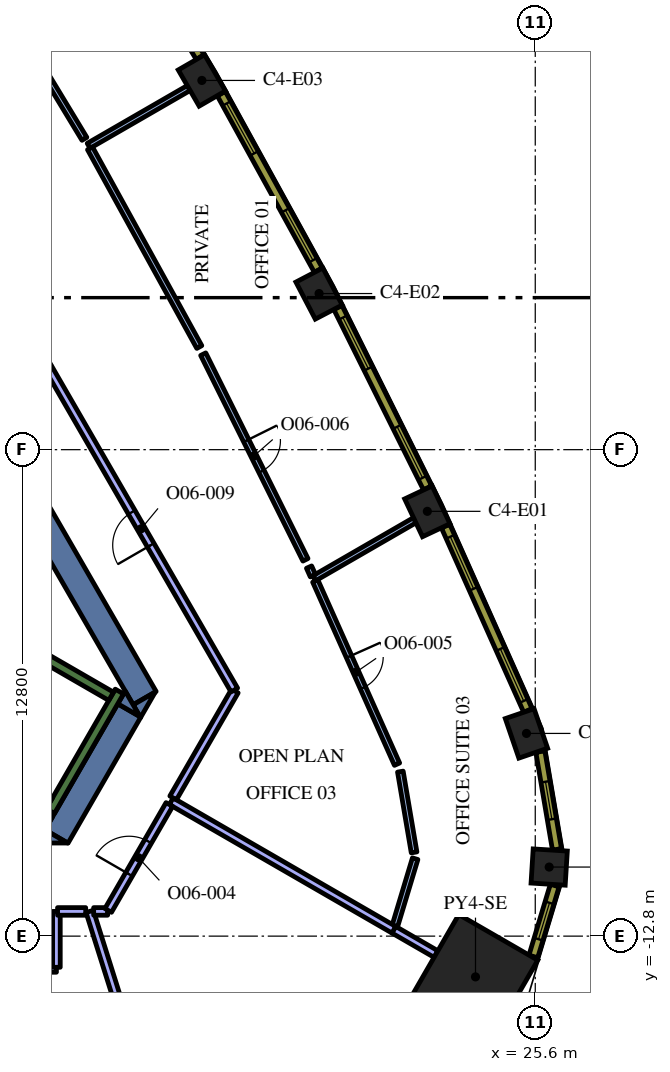
"""IFC4 building model, lengths in metres.
Left out: names, types, materials, properties, quantities, classifications, styles, units other than length and angle.
Written with IfcOpenShell. Run it as: python <this file> out.ifc"""

import sys

from ifc_helpers import new_model, si_unit, direction, frame, frame_2d, origin, origin_2d, place, context, subcontext, project, spatial, polyline, rectangle, outline, extrude, element, fill, save


model = new_model("IFC4")
c1 = context("Model", 3, precision=1e-05, world=origin(), true_north=direction((0.0, 1.0)))
c2 = subcontext(c1, "Body", "Model", "MODEL_VIEW")
j1 = project(units=[si_unit("LENGTHUNIT", "METRE"), si_unit("PLANEANGLEUNIT", "RADIAN")], contexts=[c1])
p1 = place(None, origin())
s1 = spatial("IfcSite", under=j1, at=p1, CompositionType="ELEMENT")
p2 = place(p1, origin())
s2 = spatial("IfcBuilding", under=s1, at=p2, CompositionType="ELEMENT")
p3 = place(p2, frame((0.0, 0.0, 201.6)))
s3 = spatial("IfcBuildingStorey", under=s2, at=p3, CompositionType="ELEMENT", Elevation=201.6)
p4 = place(p3, frame((24.027, -13.872, 0.0), z_axis=(0.0, 0.0, 1.0), x_axis=(0.866025403784, -0.5, 0.0)))
e1 = element("IfcColumn", 1, at=p4, inside=s3, PredefinedType="COLUMN", context=c2, shape_type="SweptSolid", body=[
    extrude(rectangle(XDim=2.4, YDim=2.4, at=origin_2d()), origin(), (0.0, 0.0, 1.0), 4.2),
])
p5 = place(p3, frame((25.967, -10.982, 0.0), z_axis=(0.0, 0.0, 1.0), x_axis=(0.062217428964, 0.998062619044, 0.0)))
e2 = element("IfcColumn", 2, at=p5, inside=s3, PredefinedType="COLUMN", context=c2, shape_type="SweptSolid", body=[
    extrude(rectangle(XDim=0.9, YDim=0.9, at=origin_2d()), origin(), (0.0, 0.0, 1.0), 4.2),
])
for number, where, z_axis, x_axis in (
    (3, (25.369, -7.466, 0.0), (0.0, 0.0, 1.0), (-0.324, 0.946, 0.0)),
    (4, (22.76, -1.623, 0.0), (0.0, 0.0, 1.0), (-0.426, 0.905, 0.0)),
    (5, (19.912, 4.108, 0.0), (0.0, 0.0, 1.0), (-0.464, 0.886, 0.0)),
    (6, (16.827, 9.715, 0.0), (0.0, 0.0, 1.0), (-0.5, 0.866, 0.0)),
):
    element("IfcColumn", number, at=place(p3, frame(where, z_axis=z_axis, x_axis=x_axis)), inside=s3, PredefinedType="COLUMN", context=c2, shape_type="SweptSolid", body=[
        extrude(rectangle(XDim=1.1, YDim=0.8, at=origin_2d()), origin(), (0.0, 0.0, 1.0), 4.2),
    ])
p6 = place(p3, frame((9.085, 4.264, 0.0), z_axis=(0.0, 0.0, 1.0), x_axis=(0.499998082512, -0.866026510844, 0.0)))
e7 = element("IfcWall", 7, at=p6, inside=s3, PredefinedType="SOLIDWALL", context=c2, shape_type="SweptSolid", body=[
    extrude(rectangle(XDim=12.472, YDim=0.7, at=frame_2d((6.236, 0.0))), origin(), (0.0, 0.0, 1.0), 4.2),
])
p7 = place(p3, origin())
e8 = element("IfcWall", 8, at=p7, inside=s3, PredefinedType="SOLIDWALL", context=c2, shape_type="SweptSolid", body=[
    extrude(outline(polyline([(15.213, -7.05), (15.019, -6.714), (15.601, -6.378), (15.213, -7.05)])), origin(), (0.0, 0.0, 1.0), 4.2),
])
p8 = place(p3, frame((13.003, -10.179, 0.0), z_axis=(0.0, 0.0, 1.0), x_axis=(0.499972675833, 0.866041178825, 0.0)))
e9 = element("IfcWall", 9, at=p8, inside=s3, PredefinedType="SOLIDWALL", context=c2, shape_type="SweptSolid", body=[
    extrude(rectangle(XDim=3.829, YDim=0.7, at=frame_2d((1.915, 0.0))), origin(), (0.0, 0.0, 1.0), 4.2),
])
e10 = element("IfcWall", 10, at=p7, inside=s3, PredefinedType="SOLIDWALL", context=c2, shape_type="SweptSolid", body=[
    extrude(outline(polyline([(12.5, -10.35), (12.698, -10.005), (13.296, -10.35), (12.5, -10.35)])), origin(), (0.0, 0.0, 1.0), 4.2),
])
e11 = element("IfcWall", 11, at=p7, inside=s3, PredefinedType="SOLIDWALL", context=c2, shape_type="SweptSolid", body=[
    extrude(outline(polyline([(14.809, -6.35), (15.197, -7.022), (14.615, -6.686), (14.809, -6.35)])), origin(), (0.0, 0.0, 1.0), 4.2),
])
e12 = element("IfcWall", 12, at=p7, inside=s3, PredefinedType="SOLIDWALL", context=c2, shape_type="SweptSolid", body=[
    extrude(outline(polyline([(12.904, -9.65), (12.516, -10.322), (12.516, -9.65), (12.904, -9.65)])), origin(), (0.0, 0.0, 1.0), 4.2),
])
p9 = place(p3, frame((12.84, -9.511, 0.0), z_axis=(0.0, 0.0, 1.0), x_axis=(0.500048121057, 0.865997619297, 0.0)))
e13 = element("IfcWall", 13, at=p9, inside=s3, PredefinedType="SOLIDWALL", context=c2, shape_type="SweptSolid", body=[
    extrude(rectangle(XDim=3.634, YDim=0.25, at=frame_2d((1.817, 0.0))), origin(), (0.0, 0.0, 1.0), 4.2),
])
p10 = place(p3, frame((12.84, -9.261, 0.0), z_axis=(0.0, 0.0, 1.0), x_axis=(-0.866013990052, 0.500019768644, 0.0)))
e14 = element("IfcWall", 14, at=p10, inside=s3, PredefinedType="SOLIDWALL", context=c2, shape_type="SweptSolid", body=[
    extrude(rectangle(XDim=6.8, YDim=0.25, at=frame_2d((3.4, 0.0))), origin(), (0.0, 0.0, 1.0), 4.2),
])
p11 = place(p3, frame((8.334, -2.964, 0.0), z_axis=(0.0, 0.0, 1.0), x_axis=(0.866016039709, -0.500016218704, 0.0)))
e15 = element("IfcWall", 15, at=p11, inside=s3, PredefinedType="SOLIDWALL", context=c2, shape_type="SweptSolid", body=[
    extrude(rectangle(XDim=7.05, YDim=0.25, at=frame_2d((3.525, 0.0))), origin(), (0.0, 0.0, 1.0), 4.2),
])
p12 = place(p3, frame((13.875, -12.15, 0.0), z_axis=(0.0, 0.0, 1.0), x_axis=(0.3005606746, -0.953762696316, 0.0)))
e16 = element("IfcWall", 16, at=p12, inside=s3, PredefinedType="PARTITIONING", context=c2, shape_type="SweptSolid", body=[
    extrude(rectangle(XDim=6.9, YDim=0.2, at=frame_2d((3.45, 0.0))), origin(), (0.0, 0.0, 1.0), 3.45),
])
p13 = place(p3, frame((6.517, -13.65, 0.0), z_axis=(0.0, 0.0, 1.0), x_axis=(1.0, 0.0, 0.0)))
e17 = element("IfcWall", 17, at=p13, inside=s3, PredefinedType="PARTITIONING", context=c2, shape_type="SweptSolid", body=[
    extrude(rectangle(XDim=6.483, YDim=0.2, at=frame_2d((3.242, 0.0))), origin(), (0.0, 0.0, 1.0), 3.45),
])
p14 = place(p13, frame((2.7, 0.0, 0.0)))
e18 = element("IfcOpeningElement", 18, at=p14, cuts=e17, PredefinedType="OPENING", context=c2, shape_type="SweptSolid", body=[
    extrude(rectangle(XDim=1.0, YDim=2.1, at=frame_2d((0.5, 1.05))), frame((0.0, 0.11, 0.0), z_axis=(0.0, -1.0, 0.0), x_axis=(1.0, 0.0, 0.0)), (0.0, 0.0, 1.0), 0.22),
])
p15 = place(p3, frame((13.0, -13.62, 0.0), z_axis=(0.0, 0.0, 1.0), x_axis=(0.0, 1.0, 0.0)))
e19 = element("IfcWall", 19, at=p15, inside=s3, PredefinedType="PARTITIONING", context=c2, shape_type="SweptSolid", body=[
    extrude(rectangle(XDim=1.47, YDim=0.2, at=frame_2d((0.735, 0.0))), origin(), (0.0, 0.0, 1.0), 3.45),
])
p16 = place(p3, frame((13.03, -12.15, 0.0), z_axis=(0.0, 0.0, 1.0), x_axis=(1.0, 0.0, 0.0)))
e20 = element("IfcWall", 20, at=p16, inside=s3, PredefinedType="PARTITIONING", context=c2, shape_type="SweptSolid", body=[
    extrude(rectangle(XDim=0.74, YDim=0.2, at=frame_2d((0.37, 0.0))), origin(), (0.0, 0.0, 1.0), 3.45),
])
p17 = place(p3, frame((21.873, -12.628, 0.0), z_axis=(0.0, 0.0, 1.0), x_axis=(0.866052988967, -0.499952218018, 0.0)))
e21 = element("IfcWall", 21, at=p17, inside=s3, PredefinedType="PARTITIONING", context=c2, shape_type="SweptSolid", body=[
    extrude(rectangle(XDim=1.288, YDim=0.2, at=frame_2d((0.644, 0.0))), origin(), (0.0, 0.0, 1.0), 3.45),
])
p18 = place(p3, frame((16.021, -9.25, 0.0), z_axis=(0.0, 0.0, 1.0), x_axis=(0.86602692059, -0.499997372806, 0.0)))
e22 = element("IfcWall", 22, at=p18, inside=s3, PredefinedType="PARTITIONING", context=c2, shape_type="SweptSolid", body=[
    extrude(rectangle(XDim=6.765, YDim=0.2, at=frame_2d((3.382, 0.0))), origin(), (0.0, 0.0, 1.0), 3.45),
])
p19 = place(p3, frame((13.98, -12.15, 0.0), z_axis=(0.0, 0.0, 1.0), x_axis=(1.0, 0.0, 0.0)))
e23 = element("IfcWall", 23, at=p19, inside=s3, PredefinedType="PARTITIONING", context=c2, shape_type="SweptSolid", body=[
    extrude(rectangle(XDim=0.367, YDim=0.2, at=frame_2d((0.184, 0.0))), origin(), (0.0, 0.0, 1.0), 3.45),
])
p20 = place(p3, frame((14.362, -12.124, 0.0), z_axis=(0.0, 0.0, 1.0), x_axis=(0.500022299258, 0.866012528919, 0.0)))
e24 = element("IfcWall", 24, at=p20, inside=s3, PredefinedType="PARTITIONING", context=c2, shape_type="SweptSolid", body=[
    extrude(rectangle(XDim=3.219, YDim=0.2, at=frame_2d((1.609, 0.0))), origin(), (0.0, 0.0, 1.0), 3.45),
])
p21 = place(p20, frame((1.1, 0.0, 0.0)))
e25 = element("IfcOpeningElement", 25, at=p21, cuts=e24, PredefinedType="OPENING", context=c2, shape_type="SweptSolid", body=[
    extrude(rectangle(XDim=1.0, YDim=2.1, at=frame_2d((0.5, 1.05))), frame((0.0, 0.11, 0.0), z_axis=(0.0, -1.0, 0.0), x_axis=(1.0, 0.0, 0.0)), (0.0, 0.0, 1.0), 0.22),
])
p22 = place(p3, frame((19.78, -3.386, 0.0), z_axis=(0.0, 0.0, 1.0), x_axis=(0.866063280451, 0.49993438995, 0.0)))
e26 = element("IfcWall", 26, at=p22, inside=s3, PredefinedType="PARTITIONING", context=c2, shape_type="SweptSolid", body=[
    extrude(rectangle(XDim=3.058, YDim=0.15, at=frame_2d((1.529, 0.0))), origin(), (0.0, 0.0, 1.0), 3.45),
])
p23 = place(p3, frame((21.906, -12.532, 0.0), z_axis=(0.0, 0.0, 1.0), x_axis=(0.288789848591, 0.957392512688, 0.0)))
e27 = element("IfcWall", 27, at=p23, inside=s3, PredefinedType="PARTITIONING", context=c2, shape_type="SweptSolid", body=[
    extrude(rectangle(XDim=1.848, YDim=0.15, at=frame_2d((0.924, 0.0))), origin(), (0.0, 0.0, 1.0), 3.45),
])
p24 = place(p3, frame((22.412, -10.597, 0.0), z_axis=(0.0, 0.0, 1.0), x_axis=(-0.167612004459, 0.985853039738, 0.0)))
e28 = element("IfcWall", 28, at=p24, inside=s3, PredefinedType="PARTITIONING", context=c2, shape_type="SweptSolid", body=[
    extrude(rectangle(XDim=2.156, YDim=0.15, at=frame_2d((1.078, 0.0))), origin(), (0.0, 0.0, 1.0), 3.45),
])
p25 = place(p3, frame((19.811, -3.455, 0.0), z_axis=(0.0, 0.0, 1.0), x_axis=(0.407605393886, -0.913158169692, 0.0)))
e29 = element("IfcWall", 29, at=p25, inside=s3, PredefinedType="PARTITIONING", context=c2, shape_type="SweptSolid", body=[
    extrude(rectangle(XDim=5.279, YDim=0.15, at=frame_2d((2.64, 0.0))), origin(), (0.0, 0.0, 1.0), 3.45),
])
p26 = place(p25, frame((2.179, 0.0, 0.0)))
e30 = element("IfcOpeningElement", 30, at=p26, cuts=e29, PredefinedType="OPENING", context=c2, shape_type="SweptSolid", body=[
    extrude(rectangle(XDim=0.9, YDim=2.1, at=frame_2d((0.45, 1.05))), frame((0.0, 0.085, 0.0), z_axis=(0.0, -1.0, 0.0), x_axis=(1.0, 0.0, 0.0)), (0.0, 0.0, 1.0), 0.17),
])
p27 = place(p3, frame((13.848, 7.995, 0.0), z_axis=(0.0, 0.0, 1.0), x_axis=(0.86603583403, 0.49998193385, 0.0)))
e31 = element("IfcWall", 31, at=p27, inside=s3, PredefinedType="PARTITIONING", context=c2, shape_type="SweptSolid", body=[
    extrude(rectangle(XDim=3.041, YDim=0.15, at=frame_2d((1.52, 0.0))), origin(), (0.0, 0.0, 1.0), 3.45),
])
p28 = place(p3, frame((19.75, -3.317, 0.0), z_axis=(0.0, 0.0, 1.0), x_axis=(-0.406774979688, 0.913528388119, 0.0)))
e32 = element("IfcWall", 32, at=p28, inside=s3, PredefinedType="PARTITIONING", context=c2, shape_type="SweptSolid", body=[
    extrude(rectangle(XDim=0.249, YDim=0.15, at=frame_2d((0.125, 0.0))), origin(), (0.0, 0.0, 1.0), 3.45),
])
p29 = place(p3, frame((16.863, 2.513, 0.0), z_axis=(0.0, 0.0, 1.0), x_axis=(0.445159947046, -0.895451071553, 0.0)))
e33 = element("IfcWall", 33, at=p29, inside=s3, PredefinedType="PARTITIONING", context=c2, shape_type="SweptSolid", body=[
    extrude(rectangle(XDim=6.043, YDim=0.15, at=frame_2d((3.021, 0.0))), origin(), (0.0, 0.0, 1.0), 3.45),
])
p30 = place(p29, frame((2.542, 0.0, 0.0)))
e34 = element("IfcOpeningElement", 34, at=p30, cuts=e33, PredefinedType="OPENING", context=c2, shape_type="SweptSolid", body=[
    extrude(rectangle(XDim=0.9, YDim=2.1, at=frame_2d((0.45, 1.05))), frame((0.0, 0.085, 0.0), z_axis=(0.0, -1.0, 0.0), x_axis=(1.0, 0.0, 0.0)), (0.0, 0.0, 1.0), 0.17),
])
p31 = place(p3, frame((16.76, 2.7, 0.0), z_axis=(0.0, 0.0, 1.0), x_axis=(-0.481907755985, 0.876221955169, 0.0)))
e35 = element("IfcWall", 35, at=p31, inside=s3, PredefinedType="PARTITIONING", context=c2, shape_type="SweptSolid", body=[
    extrude(rectangle(XDim=5.967, YDim=0.15, at=frame_2d((2.984, 0.0))), origin(), (0.0, 0.0, 1.0), 3.45),
])
p32 = place(p3, frame((13.737, 8.178, 0.0), z_axis=(0.0, 0.0, 1.0), x_axis=(-0.517884383874, 0.855450620983, 0.0)))
e36 = element("IfcWall", 36, at=p32, inside=s3, PredefinedType="PARTITIONING", context=c2, shape_type="SweptSolid", body=[
    extrude(rectangle(XDim=6.043, YDim=0.15, at=frame_2d((3.021, 0.0))), origin(), (0.0, 0.0, 1.0), 3.45),
])
p33 = place(p3, frame((16.072, -9.163, 0.0), z_axis=(0.0, 0.0, 1.0), x_axis=(0.500010870188, 0.866019127788, 0.0)))
e37 = element("IfcWall", 37, at=p33, inside=s3, PredefinedType="PARTITIONING", context=c2, shape_type="SweptSolid", body=[
    extrude(rectangle(XDim=3.249, YDim=0.2, at=frame_2d((1.624, 0.0))), origin(), (0.0, 0.0, 1.0), 3.45),
])
p34 = place(p3, frame((17.681, -6.324, 0.0), z_axis=(0.0, 0.0, 1.0), x_axis=(-0.500021153861, 0.866013190252, 0.0)))
e38 = element("IfcWall", 38, at=p34, inside=s3, PredefinedType="PARTITIONING", context=c2, shape_type="SweptSolid", body=[
    extrude(rectangle(XDim=9.787, YDim=0.2, at=frame_2d((4.894, 0.0))), origin(), (0.0, 0.0, 1.0), 3.45),
])
p35 = place(p34, frame((4.4, 0.0, 0.0)))
e39 = element("IfcOpeningElement", 39, at=p35, cuts=e38, PredefinedType="OPENING", context=c2, shape_type="SweptSolid", body=[
    extrude(rectangle(XDim=1.0, YDim=2.1, at=frame_2d((0.5, 1.05))), frame((0.0, 0.11, 0.0), z_axis=(0.0, -1.0, 0.0), x_axis=(1.0, 0.0, 0.0)), (0.0, 0.0, 1.0), 0.22),
])
p36 = place(p3, frame((25.55, -13.335, 0.0), z_axis=(0.0, 0.0, 1.0), x_axis=(0.288727209095, 0.957411405159, 0.0)))
e40 = element("IfcWall", 40, at=p36, inside=s3, PredefinedType="SOLIDWALL", context=c2, shape_type="SweptSolid", body=[
    extrude(rectangle(XDim=1.948, YDim=0.24, at=frame_2d((0.974, 0.0))), origin(), (0.0, 0.0, 1.0), 3.95),
])
p37 = place(p36, frame((0.474, 0.0, 0.9)))
e41 = element("IfcOpeningElement", 41, at=p37, cuts=e40, PredefinedType="OPENING", context=c2, shape_type="SweptSolid", body=[
    extrude(rectangle(XDim=1.0, YDim=2.55, at=frame_2d((0.5, 1.275))), frame((0.0, 0.13, 0.0), z_axis=(0.0, -1.0, 0.0), x_axis=(1.0, 0.0, 0.0)), (0.0, 0.0, 1.0), 0.26),
])
p38 = place(p3, frame((26.172, -10.517, 0.0), z_axis=(0.0, 0.0, 1.0), x_axis=(-0.167660055546, 0.985844869021, 0.0)))
e42 = element("IfcWall", 42, at=p38, inside=s3, PredefinedType="SOLIDWALL", context=c2, shape_type="SweptSolid", body=[
    extrude(rectangle(XDim=2.609, YDim=0.24, at=frame_2d((1.305, 0.0))), origin(), (0.0, 0.0, 1.0), 3.95),
])
p39 = place(p38, frame((0.805, 0.0, 0.9)))
e43 = element("IfcOpeningElement", 43, at=p39, cuts=e42, PredefinedType="OPENING", context=c2, shape_type="SweptSolid", body=[
    extrude(rectangle(XDim=1.0, YDim=2.55, at=frame_2d((0.5, 1.275))), frame((0.0, 0.13, 0.0), z_axis=(0.0, -1.0, 0.0), x_axis=(1.0, 0.0, 0.0)), (0.0, 0.0, 1.0), 0.26),
])
p40 = place(p3, frame((25.405, -6.861, 0.0), z_axis=(0.0, 0.0, 1.0), x_axis=(-0.407579651789, 0.913169659728, 0.0)))
e44 = element("IfcWall", 44, at=p40, inside=s3, PredefinedType="SOLIDWALL", context=c2, shape_type="SweptSolid", body=[
    extrude(rectangle(XDim=5.311, YDim=0.24, at=frame_2d((2.655, 0.0))), origin(), (0.0, 0.0, 1.0), 3.95),
])
p41 = place(p40, frame((0.271, 0.0, 0.9)))
e45 = element("IfcOpeningElement", 45, at=p41, cuts=e44, PredefinedType="OPENING", context=c2, shape_type="SweptSolid", body=[
    extrude(rectangle(XDim=1.5, YDim=2.55, at=frame_2d((0.75, 1.275))), frame((0.0, 0.13, 0.0), z_axis=(0.0, -1.0, 0.0), x_axis=(1.0, 0.0, 0.0)), (0.0, 0.0, 1.0), 0.26),
])
p42 = place(p40, frame((3.504, 0.0, 0.9)))
e46 = element("IfcOpeningElement", 46, at=p42, cuts=e44, PredefinedType="OPENING", context=c2, shape_type="SweptSolid", body=[
    extrude(rectangle(XDim=1.5, YDim=2.55, at=frame_2d((0.75, 1.275))), frame((0.0, 0.13, 0.0), z_axis=(0.0, -1.0, 0.0), x_axis=(1.0, 0.0, 0.0)), (0.0, 0.0, 1.0), 0.26),
])
p43 = place(p3, frame((22.766, -1.005, 0.0), z_axis=(0.0, 0.0, 1.0), x_axis=(-0.445129582031, 0.895466166419, 0.0)))
e47 = element("IfcWall", 47, at=p43, inside=s3, PredefinedType="SOLIDWALL", context=c2, shape_type="SweptSolid", body=[
    extrude(rectangle(XDim=5.298, YDim=0.24, at=frame_2d((2.649, 0.0))), origin(), (0.0, 0.0, 1.0), 3.95),
])
p44 = place(p43, frame((0.295, 0.0, 0.9)))
e48 = element("IfcOpeningElement", 48, at=p44, cuts=e47, PredefinedType="OPENING", context=c2, shape_type="SweptSolid", body=[
    extrude(rectangle(XDim=1.5, YDim=2.55, at=frame_2d((0.75, 1.275))), frame((0.0, 0.13, 0.0), z_axis=(0.0, -1.0, 0.0), x_axis=(1.0, 0.0, 0.0)), (0.0, 0.0, 1.0), 0.26),
])
p45 = place(p43, frame((3.504, 0.0, 0.9)))
e49 = element("IfcOpeningElement", 49, at=p45, cuts=e47, PredefinedType="OPENING", context=c2, shape_type="SweptSolid", body=[
    extrude(rectangle(XDim=1.5, YDim=2.55, at=frame_2d((0.75, 1.275))), frame((0.0, 0.13, 0.0), z_axis=(0.0, -1.0, 0.0), x_axis=(1.0, 0.0, 0.0)), (0.0, 0.0, 1.0), 0.26),
])
p46 = place(p3, frame((19.892, 4.725, 0.0), z_axis=(0.0, 0.0, 1.0), x_axis=(-0.481925825015, 0.876212017256, 0.0)))
e50 = element("IfcWall", 50, at=p46, inside=s3, PredefinedType="SOLIDWALL", context=c2, shape_type="SweptSolid", body=[
    extrude(rectangle(XDim=5.299, YDim=0.24, at=frame_2d((2.649, 0.0))), origin(), (0.0, 0.0, 1.0), 3.95),
])
p47 = place(p46, frame((0.295, 0.0, 0.9)))
e51 = element("IfcOpeningElement", 51, at=p47, cuts=e50, PredefinedType="OPENING", context=c2, shape_type="SweptSolid", body=[
    extrude(rectangle(XDim=1.5, YDim=2.55, at=frame_2d((0.75, 1.275))), frame((0.0, 0.13, 0.0), z_axis=(0.0, -1.0, 0.0), x_axis=(1.0, 0.0, 0.0)), (0.0, 0.0, 1.0), 0.26),
])
p48 = place(p46, frame((3.504, 0.0, 0.9)))
e52 = element("IfcOpeningElement", 52, at=p48, cuts=e50, PredefinedType="OPENING", context=c2, shape_type="SweptSolid", body=[
    extrude(rectangle(XDim=1.5, YDim=2.55, at=frame_2d((0.75, 1.275))), frame((0.0, 0.13, 0.0), z_axis=(0.0, -1.0, 0.0), x_axis=(1.0, 0.0, 0.0)), (0.0, 0.0, 1.0), 0.26),
])
p49 = place(p3, frame((16.782, 10.331, 0.0), z_axis=(0.0, 0.0, 1.0), x_axis=(-0.517846166225, 0.855473756538, 0.0)))
e53 = element("IfcWall", 53, at=p49, inside=s3, PredefinedType="SOLIDWALL", context=c2, shape_type="SweptSolid", body=[
    extrude(rectangle(XDim=5.298, YDim=0.24, at=frame_2d((2.649, 0.0))), origin(), (0.0, 0.0, 1.0), 3.95),
])
p50 = place(p49, frame((0.294, 0.0, 0.9)))
e54 = element("IfcOpeningElement", 54, at=p50, cuts=e53, PredefinedType="OPENING", context=c2, shape_type="SweptSolid", body=[
    extrude(rectangle(XDim=1.5, YDim=2.55, at=frame_2d((0.75, 1.275))), frame((0.0, 0.13, 0.0), z_axis=(0.0, -1.0, 0.0), x_axis=(1.0, 0.0, 0.0)), (0.0, 0.0, 1.0), 0.26),
])
p51 = place(p49, frame((3.504, 0.0, 0.9)))
e55 = element("IfcOpeningElement", 55, at=p51, cuts=e53, PredefinedType="OPENING", context=c2, shape_type="SweptSolid", body=[
    extrude(rectangle(XDim=1.5, YDim=2.55, at=frame_2d((0.75, 1.275))), frame((0.0, 0.13, 0.0), z_axis=(0.0, -1.0, 0.0), x_axis=(1.0, 0.0, 0.0)), (0.0, 0.0, 1.0), 0.26),
])
p52 = place(p21, origin())
e56 = element("IfcDoor", 56, at=p52, inside=s3, OperationType="SINGLE_SWING_LEFT", PredefinedType="DOOR", context=c2, shape_type="SweptSolid", body=[
    extrude(rectangle(XDim=1.0, YDim=2.1, at=frame_2d((0.5, 1.05))), frame((0.0, 0.025, 0.0), z_axis=(0.0, -1.0, 0.0), x_axis=(1.0, 0.0, 0.0)), (0.0, 0.0, 1.0), 0.05),
])
fill(e25, e56)
p53 = place(p26, origin())
e57 = element("IfcDoor", 57, at=p53, inside=s3, OperationType="SINGLE_SWING_LEFT", PredefinedType="DOOR", context=c2, shape_type="SweptSolid", body=[
    extrude(rectangle(XDim=0.9, YDim=2.1, at=frame_2d((0.45, 1.05))), frame((0.0, 0.025, 0.0), z_axis=(0.0, -1.0, 0.0), x_axis=(1.0, 0.0, 0.0)), (0.0, 0.0, 1.0), 0.05),
])
fill(e30, e57)
p54 = place(p30, origin())
e58 = element("IfcDoor", 58, at=p54, inside=s3, OperationType="SINGLE_SWING_LEFT", PredefinedType="DOOR", context=c2, shape_type="SweptSolid", body=[
    extrude(rectangle(XDim=0.9, YDim=2.1, at=frame_2d((0.45, 1.05))), frame((0.0, 0.025, 0.0), z_axis=(0.0, -1.0, 0.0), x_axis=(1.0, 0.0, 0.0)), (0.0, 0.0, 1.0), 0.05),
])
fill(e34, e58)
p55 = place(p35, origin())
e59 = element("IfcDoor", 59, at=p55, inside=s3, OperationType="SINGLE_SWING_RIGHT", PredefinedType="DOOR", context=c2, shape_type="SweptSolid", body=[
    extrude(rectangle(XDim=1.0, YDim=2.1, at=frame_2d((0.5, 1.05))), frame((0.0, 0.025, 0.0), z_axis=(0.0, -1.0, 0.0), x_axis=(1.0, 0.0, 0.0)), (0.0, 0.0, 1.0), 0.05),
])
fill(e39, e59)
p56 = place(p37, origin())
e60 = element("IfcWindow", 60, at=p56, inside=s3, PartitioningType="SINGLE_PANEL", PredefinedType="WINDOW", context=c2, shape_type="SweptSolid", body=[
    extrude(rectangle(XDim=1.0, YDim=2.55, at=frame_2d((0.5, 1.275))), frame((0.0, 0.04, 0.0), z_axis=(0.0, -1.0, 0.0), x_axis=(1.0, 0.0, 0.0)), (0.0, 0.0, 1.0), 0.06),
])
fill(e41, e60)
p57 = place(p39, origin())
e61 = element("IfcWindow", 61, at=p57, inside=s3, PartitioningType="SINGLE_PANEL", PredefinedType="WINDOW", context=c2, shape_type="SweptSolid", body=[
    extrude(rectangle(XDim=1.0, YDim=2.55, at=frame_2d((0.5, 1.275))), frame((0.0, 0.04, 0.0), z_axis=(0.0, -1.0, 0.0), x_axis=(1.0, 0.0, 0.0)), (0.0, 0.0, 1.0), 0.06),
])
fill(e43, e61)
p58 = place(p41, origin())
e62 = element("IfcWindow", 62, at=p58, inside=s3, PartitioningType="SINGLE_PANEL", PredefinedType="WINDOW", context=c2, shape_type="SweptSolid", body=[
    extrude(rectangle(XDim=1.5, YDim=2.55, at=frame_2d((0.75, 1.275))), frame((0.0, 0.04, 0.0), z_axis=(0.0, -1.0, 0.0), x_axis=(1.0, 0.0, 0.0)), (0.0, 0.0, 1.0), 0.06),
])
fill(e45, e62)
p59 = place(p42, origin())
e63 = element("IfcWindow", 63, at=p59, inside=s3, PartitioningType="SINGLE_PANEL", PredefinedType="WINDOW", context=c2, shape_type="SweptSolid", body=[
    extrude(rectangle(XDim=1.5, YDim=2.55, at=frame_2d((0.75, 1.275))), frame((0.0, 0.04, 0.0), z_axis=(0.0, -1.0, 0.0), x_axis=(1.0, 0.0, 0.0)), (0.0, 0.0, 1.0), 0.06),
])
fill(e46, e63)
p60 = place(p44, origin())
e64 = element("IfcWindow", 64, at=p60, inside=s3, PartitioningType="SINGLE_PANEL", PredefinedType="WINDOW", context=c2, shape_type="SweptSolid", body=[
    extrude(rectangle(XDim=1.5, YDim=2.55, at=frame_2d((0.75, 1.275))), frame((0.0, 0.04, 0.0), z_axis=(0.0, -1.0, 0.0), x_axis=(1.0, 0.0, 0.0)), (0.0, 0.0, 1.0), 0.06),
])
fill(e48, e64)
p61 = place(p45, origin())
e65 = element("IfcWindow", 65, at=p61, inside=s3, PartitioningType="SINGLE_PANEL", PredefinedType="WINDOW", context=c2, shape_type="SweptSolid", body=[
    extrude(rectangle(XDim=1.5, YDim=2.55, at=frame_2d((0.75, 1.275))), frame((0.0, 0.04, 0.0), z_axis=(0.0, -1.0, 0.0), x_axis=(1.0, 0.0, 0.0)), (0.0, 0.0, 1.0), 0.06),
])
fill(e49, e65)
p62 = place(p47, origin())
e66 = element("IfcWindow", 66, at=p62, inside=s3, PartitioningType="SINGLE_PANEL", PredefinedType="WINDOW", context=c2, shape_type="SweptSolid", body=[
    extrude(rectangle(XDim=1.5, YDim=2.55, at=frame_2d((0.75, 1.275))), frame((0.0, 0.04, 0.0), z_axis=(0.0, -1.0, 0.0), x_axis=(1.0, 0.0, 0.0)), (0.0, 0.0, 1.0), 0.06),
])
fill(e51, e66)
p63 = place(p48, origin())
e67 = element("IfcWindow", 67, at=p63, inside=s3, PartitioningType="SINGLE_PANEL", PredefinedType="WINDOW", context=c2, shape_type="SweptSolid", body=[
    extrude(rectangle(XDim=1.5, YDim=2.55, at=frame_2d((0.75, 1.275))), frame((0.0, 0.04, 0.0), z_axis=(0.0, -1.0, 0.0), x_axis=(1.0, 0.0, 0.0)), (0.0, 0.0, 1.0), 0.06),
])
fill(e52, e67)
save(model, sys.argv[1])
